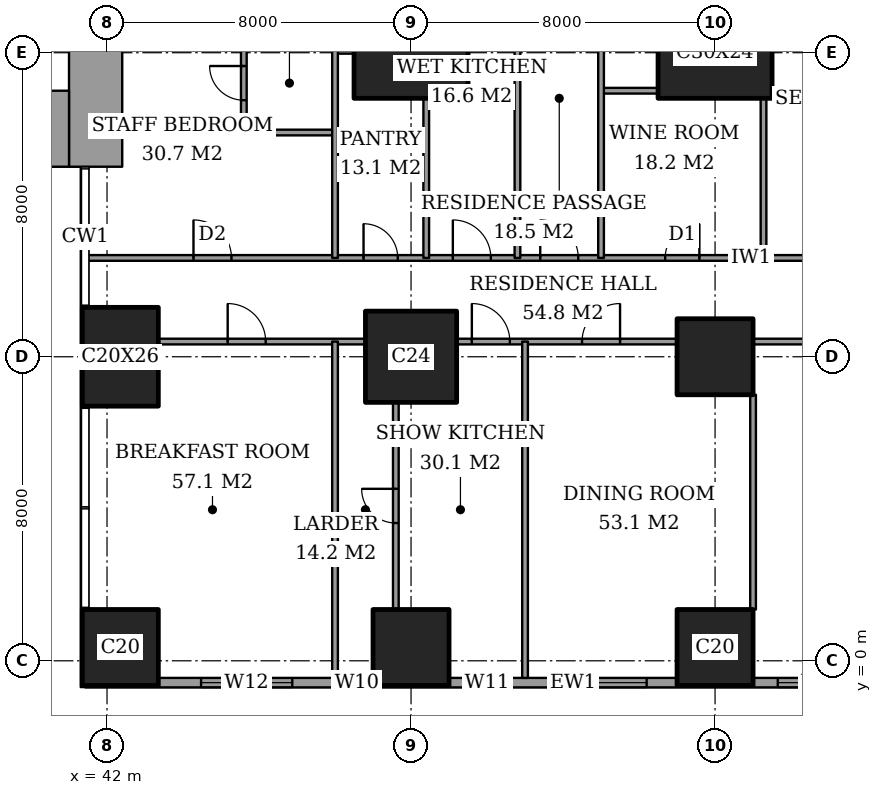
"""IFC4 building model, lengths in metres.
Left out: names, types, materials, properties, quantities, classifications, styles, units other than length and angle.
Written with IfcOpenShell. Run it as: python <this file> out.ifc"""

import sys

from ifc_helpers import new_model, si_unit, direction, frame, frame_2d, origin, origin_2d, place, context, subcontext, project, spatial, rectangle, extrude, element, fill, save


model = new_model("IFC4")
c1 = context("Model", 3, precision=1e-05, world=origin(), true_north=direction((0.0, 1.0)))
c2 = subcontext(c1, "Body", "Model", "MODEL_VIEW")
j1 = project(units=[si_unit("LENGTHUNIT", "METRE"), si_unit("PLANEANGLEUNIT", "RADIAN")], contexts=[c1])
p1 = place(None, origin())
s1 = spatial("IfcSite", under=j1, at=p1, CompositionType="ELEMENT")
p2 = place(p1, origin())
s2 = spatial("IfcBuilding", under=s1, at=p2, CompositionType="ELEMENT")
p3 = place(p2, frame((0.0, 0.0, 150.2)))
s3 = spatial("IfcBuildingStorey", under=s2, at=p3, CompositionType="ELEMENT", Elevation=150.2)
p4 = place(p3, frame((42.35, 0.35, 0.0), z_axis=(0.0, 0.0, 1.0), x_axis=(1.0, 0.0, 0.0)))
e1 = element("IfcColumn", 1, at=p4, inside=s3, PredefinedType="COLUMN", context=c2, shape_type="SweptSolid", body=[
    extrude(rectangle(XDim=2.0, YDim=2.0, at=origin_2d()), origin(), (0.0, 0.0, 1.0), 3.6),
])
p5 = place(p3, frame((42.35, 8.0, 0.0), z_axis=(0.0, 0.0, 1.0), x_axis=(1.0, 0.0, 0.0)))
e2 = element("IfcColumn", 2, at=p5, inside=s3, PredefinedType="COLUMN", context=c2, shape_type="SweptSolid", body=[
    extrude(rectangle(XDim=2.0, YDim=2.6, at=origin_2d()), origin(), (0.0, 0.0, 1.0), 3.6),
])
p6 = place(p3, frame((50.0, 0.35, 0.0), z_axis=(0.0, 0.0, 1.0), x_axis=(1.0, 0.0, 0.0)))
e3 = element("IfcColumn", 3, at=p6, inside=s3, PredefinedType="COLUMN", context=c2, shape_type="SweptSolid", body=[
    extrude(rectangle(XDim=2.0, YDim=2.0, at=origin_2d()), origin(), (0.0, 0.0, 1.0), 3.6),
])
p7 = place(p3, frame((50.0, 8.0, 0.0), z_axis=(0.0, 0.0, 1.0), x_axis=(1.0, 0.0, 0.0)))
e4 = element("IfcColumn", 4, at=p7, inside=s3, PredefinedType="COLUMN", context=c2, shape_type="SweptSolid", body=[
    extrude(rectangle(XDim=2.4, YDim=2.4, at=origin_2d()), origin(), (0.0, 0.0, 1.0), 3.6),
])
p8 = place(p3, frame((50.0, 16.0, 0.0), z_axis=(0.0, 0.0, 1.0), x_axis=(1.0, 0.0, 0.0)))
e5 = element("IfcColumn", 5, at=p8, inside=s3, PredefinedType="COLUMN", context=c2, shape_type="SweptSolid", body=[
    extrude(rectangle(XDim=3.0, YDim=2.4, at=origin_2d()), origin(), (0.0, 0.0, 1.0), 3.6),
])
for number, where, z_axis, x_axis in (
    (6, (58.0, 0.35, 0.0), (0.0, 0.0, 1.0), (1.0, 0.0, 0.0)),
    (7, (58.0, 8.0, 0.0), (0.0, 0.0, 1.0), (1.0, 0.0, 0.0)),
):
    element("IfcColumn", number, at=place(p3, frame(where, z_axis=z_axis, x_axis=x_axis)), inside=s3, PredefinedType="COLUMN", context=c2, shape_type="SweptSolid", body=[
        extrude(rectangle(XDim=2.0, YDim=2.0, at=origin_2d()), origin(), (0.0, 0.0, 1.0), 3.6),
    ])
p9 = place(p3, frame((58.0, 16.0, 0.0), z_axis=(0.0, 0.0, 1.0), x_axis=(1.0, 0.0, 0.0)))
e8 = element("IfcColumn", 8, at=p9, inside=s3, PredefinedType="COLUMN", context=c2, shape_type="SweptSolid", body=[
    extrude(rectangle(XDim=3.0, YDim=2.4, at=origin_2d()), origin(), (0.0, 0.0, 1.0), 3.6),
])
p10 = place(p3, frame((37.85, 14.0, 0.0), z_axis=(0.0, 0.0, 1.0), x_axis=(1.0, 0.0, 0.0)))
e9 = element("IfcWall", 9, at=p10, inside=s3, PredefinedType="SHEAR", context=c2, shape_type="SweptSolid", body=[
    extrude(rectangle(XDim=3.15, YDim=2.0, at=frame_2d((1.575, 0.0))), origin(), (0.0, 0.0, 1.0), 3.6),
])
p11 = place(p3, frame((41.7, 13.0, 0.0), z_axis=(0.0, 0.0, 1.0), x_axis=(0.0, 1.0, 0.0)))
e10 = element("IfcWall", 10, at=p11, inside=s3, PredefinedType="SHEAR", context=c2, shape_type="SweptSolid", body=[
    extrude(rectangle(XDim=11.85, YDim=1.4, at=frame_2d((5.925, 0.0))), origin(), (0.0, 0.0, 1.0), 3.6),
])
p12 = place(p11, frame((7.5, 0.0, 0.0)))
e11 = element("IfcOpeningElement", 11, at=p12, cuts=e10, PredefinedType="OPENING", context=c2, shape_type="SweptSolid", body=[
    extrude(rectangle(XDim=1.8, YDim=2.4, at=frame_2d((0.9, 1.2))), frame((0.0, 0.71, 0.0), z_axis=(0.0, -1.0, 0.0), x_axis=(1.0, 0.0, 0.0)), (0.0, 0.0, 1.0), 1.42),
])
p13 = place(p3, frame((41.425, -0.575, 0.0), z_axis=(0.0, 0.0, 1.0), x_axis=(1.0, 0.0, 0.0)))
e12 = element("IfcWall", 12, at=p13, inside=s3, PredefinedType="SOLIDWALL", context=c2, shape_type="SweptSolid", body=[
    extrude(rectangle(XDim=21.4, YDim=0.25, at=frame_2d((10.7, 0.0))), origin(), (0.0, 0.0, 1.0), 3.6),
])
p14 = place(p13, frame((3.05, 0.0, 0.4)))
e13 = element("IfcOpeningElement", 13, at=p14, cuts=e12, PredefinedType="OPENING", context=c2, shape_type="SweptSolid", body=[
    extrude(rectangle(XDim=2.4, YDim=2.2, at=frame_2d((1.2, 1.1))), frame((0.0, 0.135, 0.0), z_axis=(0.0, -1.0, 0.0), x_axis=(1.0, 0.0, 0.0)), (0.0, 0.0, 1.0), 0.27),
])
p15 = place(p13, frame((6.85, 0.0, 0.4)))
e14 = element("IfcOpeningElement", 14, at=p15, cuts=e12, PredefinedType="OPENING", context=c2, shape_type="SweptSolid", body=[
    extrude(rectangle(XDim=0.6, YDim=2.2, at=frame_2d((0.3, 1.1))), frame((0.0, 0.135, 0.0), z_axis=(0.0, -1.0, 0.0), x_axis=(1.0, 0.0, 0.0)), (0.0, 0.0, 1.0), 0.27),
])
p16 = place(p13, frame((9.975, 0.0, 0.4)))
e15 = element("IfcOpeningElement", 15, at=p16, cuts=e12, PredefinedType="OPENING", context=c2, shape_type="SweptSolid", body=[
    extrude(rectangle(XDim=1.2, YDim=2.2, at=frame_2d((0.6, 1.1))), frame((0.0, 0.135, 0.0), z_axis=(0.0, -1.0, 0.0), x_axis=(1.0, 0.0, 0.0)), (0.0, 0.0, 1.0), 0.27),
])
p17 = place(p13, frame((12.375, 0.0, 0.4)))
e16 = element("IfcOpeningElement", 16, at=p17, cuts=e12, PredefinedType="OPENING", context=c2, shape_type="SweptSolid", body=[
    extrude(rectangle(XDim=2.4, YDim=2.2, at=frame_2d((1.2, 1.1))), frame((0.0, 0.135, 0.0), z_axis=(0.0, -1.0, 0.0), x_axis=(1.0, 0.0, 0.0)), (0.0, 0.0, 1.0), 0.27),
])
p18 = place(p13, frame((18.225, 0.0, 0.4)))
e17 = element("IfcOpeningElement", 17, at=p18, cuts=e12, PredefinedType="OPENING", context=c2, shape_type="SweptSolid", body=[
    extrude(rectangle(XDim=2.4, YDim=2.2, at=frame_2d((1.2, 1.1))), frame((0.0, 0.135, 0.0), z_axis=(0.0, -1.0, 0.0), x_axis=(1.0, 0.0, 0.0)), (0.0, 0.0, 1.0), 0.27),
])
p19 = place(p3, frame((43.35, 8.4, 0.0), z_axis=(0.0, 0.0, 1.0), x_axis=(1.0, 0.0, 0.0)))
e18 = element("IfcWall", 18, at=p19, inside=s3, PredefinedType="PARTITIONING", context=c2, shape_type="SweptSolid", body=[
    extrude(rectangle(XDim=5.45, YDim=0.15, at=frame_2d((2.725, 0.0))), origin(), (0.0, 0.0, 1.0), 3.35),
])
p20 = place(p19, frame((1.825, 0.0, 0.0)))
e19 = element("IfcOpeningElement", 19, at=p20, cuts=e18, PredefinedType="OPENING", context=c2, shape_type="SweptSolid", body=[
    extrude(rectangle(XDim=1.0, YDim=2.1, at=frame_2d((0.5, 1.05))), frame((0.0, 0.085, 0.0), z_axis=(0.0, -1.0, 0.0), x_axis=(1.0, 0.0, 0.0)), (0.0, 0.0, 1.0), 0.17),
])
p21 = place(p3, frame((51.2, 8.4, 0.0), z_axis=(0.0, 0.0, 1.0), x_axis=(1.0, 0.0, 0.0)))
e20 = element("IfcWall", 20, at=p21, inside=s3, PredefinedType="PARTITIONING", context=c2, shape_type="SweptSolid", body=[
    extrude(rectangle(XDim=5.8, YDim=0.15, at=frame_2d((2.9, 0.0))), origin(), (0.0, 0.0, 1.0), 3.35),
])
p22 = place(p21, frame((3.3, 0.0, 0.0)))
e21 = element("IfcOpeningElement", 21, at=p22, cuts=e20, PredefinedType="OPENING", context=c2, shape_type="SweptSolid", body=[
    extrude(rectangle(XDim=1.0, YDim=2.1, at=frame_2d((0.5, 1.05))), frame((0.0, 0.085, 0.0), z_axis=(0.0, -1.0, 0.0), x_axis=(1.0, 0.0, 0.0)), (0.0, 0.0, 1.0), 0.17),
])
p23 = place(p21, frame((0.4, 0.0, 0.0)))
e22 = element("IfcOpeningElement", 22, at=p23, cuts=e20, PredefinedType="OPENING", context=c2, shape_type="SweptSolid", body=[
    extrude(rectangle(XDim=1.0, YDim=2.1, at=frame_2d((0.5, 1.05))), frame((0.0, 0.085, 0.0), z_axis=(0.0, -1.0, 0.0), x_axis=(1.0, 0.0, 0.0)), (0.0, 0.0, 1.0), 0.17),
])
p24 = place(p3, frame((59.0, 8.4, 0.0), z_axis=(0.0, 0.0, 1.0), x_axis=(1.0, 0.0, 0.0)))
e23 = element("IfcWall", 23, at=p24, inside=s3, PredefinedType="PARTITIONING", context=c2, shape_type="SweptSolid", body=[
    extrude(rectangle(XDim=5.65, YDim=0.15, at=frame_2d((2.825, 0.0))), origin(), (0.0, 0.0, 1.0), 3.35),
])
p25 = place(p24, frame((2.325, 0.0, 0.0)))
e24 = element("IfcOpeningElement", 24, at=p25, cuts=e23, PredefinedType="OPENING", context=c2, shape_type="SweptSolid", body=[
    extrude(rectangle(XDim=1.0, YDim=2.1, at=frame_2d((0.5, 1.05))), frame((0.0, 0.085, 0.0), z_axis=(0.0, -1.0, 0.0), x_axis=(1.0, 0.0, 0.0)), (0.0, 0.0, 1.0), 0.17),
])
p26 = place(p3, frame((41.439, 10.6, 0.0), z_axis=(0.0, 0.0, 1.0), x_axis=(1.0, 0.0, 0.0)))
e25 = element("IfcWall", 25, at=p26, inside=s3, PredefinedType="PARTITIONING", context=c2, shape_type="SweptSolid", body=[
    extrude(rectangle(XDim=25.011, YDim=0.15, at=frame_2d((12.505, 0.0))), origin(), (0.0, 0.0, 1.0), 3.35),
])
p27 = place(p26, frame((11.961, 0.0, 0.0)))
e26 = element("IfcOpeningElement", 26, at=p27, cuts=e25, PredefinedType="OPENING", context=c2, shape_type="SweptSolid", body=[
    extrude(rectangle(XDim=1.0, YDim=2.1, at=frame_2d((0.5, 1.05))), frame((0.0, 0.085, 0.0), z_axis=(0.0, -1.0, 0.0), x_axis=(1.0, 0.0, 0.0)), (0.0, 0.0, 1.0), 0.17),
])
p28 = place(p26, frame((20.924, 0.0, 0.0)))
e27 = element("IfcOpeningElement", 27, at=p28, cuts=e25, PredefinedType="OPENING", context=c2, shape_type="SweptSolid", body=[
    extrude(rectangle(XDim=1.0, YDim=2.1, at=frame_2d((0.5, 1.05))), frame((0.0, 0.085, 0.0), z_axis=(0.0, -1.0, 0.0), x_axis=(1.0, 0.0, 0.0)), (0.0, 0.0, 1.0), 0.17),
])
p29 = place(p26, frame((15.249, 0.0, 0.0)))
e28 = element("IfcOpeningElement", 28, at=p29, cuts=e25, PredefinedType="OPENING", context=c2, shape_type="SweptSolid", body=[
    extrude(rectangle(XDim=0.9, YDim=2.1, at=frame_2d((0.45, 1.05))), frame((0.0, 0.085, 0.0), z_axis=(0.0, -1.0, 0.0), x_axis=(1.0, 0.0, 0.0)), (0.0, 0.0, 1.0), 0.17),
])
p30 = place(p26, frame((9.661, 0.0, 0.0)))
e29 = element("IfcOpeningElement", 29, at=p30, cuts=e25, PredefinedType="OPENING", context=c2, shape_type="SweptSolid", body=[
    extrude(rectangle(XDim=1.0, YDim=2.1, at=frame_2d((0.5, 1.05))), frame((0.0, 0.085, 0.0), z_axis=(0.0, -1.0, 0.0), x_axis=(1.0, 0.0, 0.0)), (0.0, 0.0, 1.0), 0.17),
])
p31 = place(p26, frame((7.311, 0.0, 0.0)))
e30 = element("IfcOpeningElement", 30, at=p31, cuts=e25, PredefinedType="OPENING", context=c2, shape_type="SweptSolid", body=[
    extrude(rectangle(XDim=0.9, YDim=2.1, at=frame_2d((0.45, 1.05))), frame((0.0, 0.085, 0.0), z_axis=(0.0, -1.0, 0.0), x_axis=(1.0, 0.0, 0.0)), (0.0, 0.0, 1.0), 0.17),
])
p32 = place(p26, frame((2.836, 0.0, 0.0)))
e31 = element("IfcOpeningElement", 31, at=p32, cuts=e25, PredefinedType="OPENING", context=c2, shape_type="SweptSolid", body=[
    extrude(rectangle(XDim=1.0, YDim=2.1, at=frame_2d((0.5, 1.05))), frame((0.0, 0.085, 0.0), z_axis=(0.0, -1.0, 0.0), x_axis=(1.0, 0.0, 0.0)), (0.0, 0.0, 1.0), 0.17),
])
p33 = place(p3, frame((45.6, 13.9, 0.0), z_axis=(0.0, 0.0, 1.0), x_axis=(1.0, 0.0, 0.0)))
e32 = element("IfcWall", 32, at=p33, inside=s3, PredefinedType="PARTITIONING", context=c2, shape_type="SweptSolid", body=[
    extrude(rectangle(XDim=2.4, YDim=0.15, at=frame_2d((1.2, 0.0))), origin(), (0.0, 0.0, 1.0), 3.35),
])
p34 = place(p3, frame((55.0, 15.0, 0.0), z_axis=(0.0, 0.0, 1.0), x_axis=(1.0, 0.0, 0.0)))
e33 = element("IfcWall", 33, at=p34, inside=s3, PredefinedType="PARTITIONING", context=c2, shape_type="SweptSolid", body=[
    extrude(rectangle(XDim=1.5, YDim=0.15, at=frame_2d((0.75, 0.0))), origin(), (0.0, 0.0, 1.0), 3.35),
])
p35 = place(p3, frame((48.0, 16.05, 0.0), z_axis=(0.0, 0.0, 1.0), x_axis=(1.0, 0.0, 0.0)))
e34 = element("IfcWall", 34, at=p35, inside=s3, PredefinedType="PARTITIONING", context=c2, shape_type="SweptSolid", body=[
    extrude(rectangle(XDim=0.5, YDim=0.15, at=frame_2d((0.25, 0.0))), origin(), (0.0, 0.0, 1.0), 2.634),
])
p36 = place(p3, frame((45.6, 13.9, 0.0), z_axis=(0.0, 0.0, 1.0), x_axis=(0.0, 1.0, 0.0)))
e35 = element("IfcWall", 35, at=p36, inside=s3, PredefinedType="PARTITIONING", context=c2, shape_type="SweptSolid", body=[
    extrude(rectangle(XDim=2.6, YDim=0.15, at=frame_2d((1.3, 0.0))), origin(), (0.0, 0.0, 1.0), 3.35),
])
p37 = place(p36, frame((0.85, 0.0, 0.0)))
e36 = element("IfcOpeningElement", 36, at=p37, cuts=e35, PredefinedType="OPENING", context=c2, shape_type="SweptSolid", body=[
    extrude(rectangle(XDim=0.9, YDim=2.1, at=frame_2d((0.45, 1.05))), frame((0.0, 0.085, 0.0), z_axis=(0.0, -1.0, 0.0), x_axis=(1.0, 0.0, 0.0)), (0.0, 0.0, 1.0), 0.17),
])
p38 = place(p3, frame((48.0, -0.45, 0.0), z_axis=(0.0, 0.0, 1.0), x_axis=(0.0, 1.0, 0.0)))
e37 = element("IfcWall", 37, at=p38, inside=s3, PredefinedType="PARTITIONING", context=c2, shape_type="SweptSolid", body=[
    extrude(rectangle(XDim=8.85, YDim=0.15, at=frame_2d((4.425, 0.0))), origin(), (0.0, 0.0, 1.0), 3.35),
])
p39 = place(p3, frame((48.0, 10.6, 0.0), z_axis=(0.0, 0.0, 1.0), x_axis=(0.0, 1.0, 0.0)))
e38 = element("IfcWall", 38, at=p39, inside=s3, PredefinedType="PARTITIONING", context=c2, shape_type="SweptSolid", body=[
    extrude(rectangle(XDim=8.4, YDim=0.15, at=frame_2d((4.2, 0.0))), origin(), (0.0, 0.0, 1.0), 3.35),
])
p40 = place(p39, frame((6.7, 0.0, 0.0)))
e39 = element("IfcOpeningElement", 39, at=p40, cuts=e38, PredefinedType="OPENING", context=c2, shape_type="SweptSolid", body=[
    extrude(rectangle(XDim=0.9, YDim=2.1, at=frame_2d((0.45, 1.05))), frame((0.0, 0.085, 0.0), z_axis=(0.0, -1.0, 0.0), x_axis=(1.0, 0.0, 0.0)), (0.0, 0.0, 1.0), 0.17),
])
p41 = place(p3, frame((49.6, 1.35, 0.0), z_axis=(0.0, 0.0, 1.0), x_axis=(0.0, 1.0, 0.0)))
e40 = element("IfcWall", 40, at=p41, inside=s3, PredefinedType="PARTITIONING", context=c2, shape_type="SweptSolid", body=[
    extrude(rectangle(XDim=5.45, YDim=0.15, at=frame_2d((2.725, 0.0))), origin(), (0.0, 0.0, 1.0), 3.35),
])
p42 = place(p41, frame((2.275, 0.0, 0.0)))
e41 = element("IfcOpeningElement", 41, at=p42, cuts=e40, PredefinedType="OPENING", context=c2, shape_type="SweptSolid", body=[
    extrude(rectangle(XDim=0.9, YDim=2.1, at=frame_2d((0.45, 1.05))), frame((0.0, 0.085, 0.0), z_axis=(0.0, -1.0, 0.0), x_axis=(1.0, 0.0, 0.0)), (0.0, 0.0, 1.0), 0.17),
])
p43 = place(p3, frame((50.4, 10.6, 0.0), z_axis=(0.0, 0.0, 1.0), x_axis=(0.0, 1.0, 0.0)))
e42 = element("IfcWall", 42, at=p43, inside=s3, PredefinedType="PARTITIONING", context=c2, shape_type="SweptSolid", body=[
    extrude(rectangle(XDim=4.2, YDim=0.15, at=frame_2d((2.1, 0.0))), origin(), (0.0, 0.0, 1.0), 3.35),
])
p44 = place(p3, frame((52.8, 10.6, 0.0), z_axis=(0.0, 0.0, 1.0), x_axis=(0.0, 1.0, 0.0)))
e43 = element("IfcWall", 43, at=p44, inside=s3, PredefinedType="PARTITIONING", context=c2, shape_type="SweptSolid", body=[
    extrude(rectangle(XDim=8.4, YDim=0.15, at=frame_2d((4.2, 0.0))), origin(), (0.0, 0.0, 1.0), 3.35),
])
p45 = place(p3, frame((53.0, -0.45, 0.0), z_axis=(0.0, 0.0, 1.0), x_axis=(0.0, 1.0, 0.0)))
e44 = element("IfcWall", 44, at=p45, inside=s3, PredefinedType="PARTITIONING", context=c2, shape_type="SweptSolid", body=[
    extrude(rectangle(XDim=8.85, YDim=0.15, at=frame_2d((4.425, 0.0))), origin(), (0.0, 0.0, 1.0), 3.35),
])
p46 = place(p3, frame((55.0, 10.6, 0.0), z_axis=(0.0, 0.0, 1.0), x_axis=(0.0, 1.0, 0.0)))
e45 = element("IfcWall", 45, at=p46, inside=s3, PredefinedType="PARTITIONING", context=c2, shape_type="SweptSolid", body=[
    extrude(rectangle(XDim=11.0, YDim=0.15, at=frame_2d((5.5, 0.0))), origin(), (0.0, 0.0, 1.0), 3.35),
])
p47 = place(p46, frame((9.2, 0.0, 0.0)))
e46 = element("IfcOpeningElement", 46, at=p47, cuts=e45, PredefinedType="OPENING", context=c2, shape_type="SweptSolid", body=[
    extrude(rectangle(XDim=1.0, YDim=2.1, at=frame_2d((0.5, 1.05))), frame((0.0, 0.085, 0.0), z_axis=(0.0, -1.0, 0.0), x_axis=(1.0, 0.0, 0.0)), (0.0, 0.0, 1.0), 0.17),
])
p48 = place(p3, frame((59.0, 1.35, 0.0), z_axis=(0.0, 0.0, 1.0), x_axis=(0.0, 1.0, 0.0)))
e47 = element("IfcWall", 47, at=p48, inside=s3, PredefinedType="PARTITIONING", context=c2, shape_type="SweptSolid", body=[
    extrude(rectangle(XDim=5.65, YDim=0.15, at=frame_2d((2.825, 0.0))), origin(), (0.0, 0.0, 1.0), 3.35),
])
p49 = place(p3, frame((59.275, 10.6, 0.0), z_axis=(0.0, 0.0, 1.0), x_axis=(0.0, 1.0, 0.0)))
e48 = element("IfcWall", 48, at=p49, inside=s3, PredefinedType="PARTITIONING", context=c2, shape_type="SweptSolid", body=[
    extrude(rectangle(XDim=4.2, YDim=0.15, at=frame_2d((2.1, 0.0))), origin(), (0.0, 0.0, 1.0), 3.35),
])
p50 = place(p14, origin())
e49 = element("IfcWindow", 49, at=p50, inside=s3, PartitioningType="SINGLE_PANEL", PredefinedType="WINDOW", context=c2, shape_type="SweptSolid", body=[
    extrude(rectangle(XDim=2.4, YDim=2.2, at=frame_2d((1.2, 1.1))), frame((0.0, 0.03, 0.0), z_axis=(0.0, -1.0, 0.0), x_axis=(1.0, 0.0, 0.0)), (0.0, 0.0, 1.0), 0.06),
])
fill(e13, e49)
p51 = place(p15, origin())
e50 = element("IfcWindow", 50, at=p51, inside=s3, PartitioningType="SINGLE_PANEL", PredefinedType="WINDOW", context=c2, shape_type="SweptSolid", body=[
    extrude(rectangle(XDim=0.6, YDim=2.2, at=frame_2d((0.3, 1.1))), frame((0.0, 0.03, 0.0), z_axis=(0.0, -1.0, 0.0), x_axis=(1.0, 0.0, 0.0)), (0.0, 0.0, 1.0), 0.06),
])
fill(e14, e50)
p52 = place(p16, origin())
e51 = element("IfcWindow", 51, at=p52, inside=s3, PartitioningType="SINGLE_PANEL", PredefinedType="WINDOW", context=c2, shape_type="SweptSolid", body=[
    extrude(rectangle(XDim=1.2, YDim=2.2, at=frame_2d((0.6, 1.1))), frame((0.0, 0.03, 0.0), z_axis=(0.0, -1.0, 0.0), x_axis=(1.0, 0.0, 0.0)), (0.0, 0.0, 1.0), 0.06),
])
fill(e15, e51)
p53 = place(p17, origin())
e52 = element("IfcWindow", 52, at=p53, inside=s3, PartitioningType="SINGLE_PANEL", PredefinedType="WINDOW", context=c2, shape_type="SweptSolid", body=[
    extrude(rectangle(XDim=2.4, YDim=2.2, at=frame_2d((1.2, 1.1))), frame((0.0, 0.03, 0.0), z_axis=(0.0, -1.0, 0.0), x_axis=(1.0, 0.0, 0.0)), (0.0, 0.0, 1.0), 0.06),
])
fill(e16, e52)
p54 = place(p18, origin())
e53 = element("IfcWindow", 53, at=p54, inside=s3, PartitioningType="SINGLE_PANEL", PredefinedType="WINDOW", context=c2, shape_type="SweptSolid", body=[
    extrude(rectangle(XDim=2.4, YDim=2.2, at=frame_2d((1.2, 1.1))), frame((0.0, 0.03, 0.0), z_axis=(0.0, -1.0, 0.0), x_axis=(1.0, 0.0, 0.0)), (0.0, 0.0, 1.0), 0.06),
])
fill(e17, e53)
p55 = place(p22, origin())
e54 = element("IfcDoor", 54, at=p55, inside=s3, OperationType="SINGLE_SWING_LEFT", PredefinedType="DOOR", context=c2, shape_type="SweptSolid", body=[
    extrude(rectangle(XDim=1.0, YDim=2.1, at=frame_2d((0.5, 1.05))), frame((0.0, 0.025, 0.0), z_axis=(0.0, -1.0, 0.0), x_axis=(1.0, 0.0, 0.0)), (0.0, 0.0, 1.0), 0.05),
])
fill(e21, e54)
p56 = place(p23, origin())
e55 = element("IfcDoor", 55, at=p56, inside=s3, OperationType="SINGLE_SWING_RIGHT", PredefinedType="DOOR", context=c2, shape_type="SweptSolid", body=[
    extrude(rectangle(XDim=1.0, YDim=2.1, at=frame_2d((0.5, 1.05))), frame((0.0, 0.025, 0.0), z_axis=(0.0, -1.0, 0.0), x_axis=(1.0, 0.0, 0.0)), (0.0, 0.0, 1.0), 0.05),
])
fill(e22, e55)
p57 = place(p42, origin())
e56 = element("IfcDoor", 56, at=p57, inside=s3, OperationType="SINGLE_SWING_LEFT", PredefinedType="DOOR", context=c2, shape_type="SweptSolid", body=[
    extrude(rectangle(XDim=0.9, YDim=2.1, at=frame_2d((0.45, 1.05))), frame((0.0, 0.025, 0.0), z_axis=(0.0, -1.0, 0.0), x_axis=(1.0, 0.0, 0.0)), (0.0, 0.0, 1.0), 0.05),
])
fill(e41, e56)
p58 = place(p20, origin())
e57 = element("IfcDoor", 57, at=p58, inside=s3, OperationType="SINGLE_SWING_RIGHT", PredefinedType="DOOR", context=c2, shape_type="SweptSolid", body=[
    extrude(rectangle(XDim=1.0, YDim=2.1, at=frame_2d((0.5, 1.05))), frame((0.0, 0.025, 0.0), z_axis=(0.0, -1.0, 0.0), x_axis=(1.0, 0.0, 0.0)), (0.0, 0.0, 1.0), 0.05),
])
fill(e19, e57)
p59 = place(p27, origin())
e58 = element("IfcDoor", 58, at=p59, inside=s3, OperationType="SINGLE_SWING_RIGHT", PredefinedType="DOOR", context=c2, shape_type="SweptSolid", body=[
    extrude(rectangle(XDim=1.0, YDim=2.1, at=frame_2d((0.5, 1.05))), frame((0.0, 0.025, 0.0), z_axis=(0.0, -1.0, 0.0), x_axis=(1.0, 0.0, 0.0)), (0.0, 0.0, 1.0), 0.05),
])
fill(e26, e58)
p60 = place(p29, origin())
e59 = element("IfcDoor", 59, at=p60, inside=s3, OperationType="SINGLE_SWING_LEFT", PredefinedType="DOOR", context=c2, shape_type="SweptSolid", body=[
    extrude(rectangle(XDim=0.9, YDim=2.1, at=frame_2d((0.45, 1.05))), frame((0.0, 0.025, 0.0), z_axis=(0.0, -1.0, 0.0), x_axis=(1.0, 0.0, 0.0)), (0.0, 0.0, 1.0), 0.05),
])
fill(e28, e59)
p61 = place(p30, origin())
e60 = element("IfcDoor", 60, at=p61, inside=s3, OperationType="SINGLE_SWING_RIGHT", PredefinedType="DOOR", context=c2, shape_type="SweptSolid", body=[
    extrude(rectangle(XDim=1.0, YDim=2.1, at=frame_2d((0.5, 1.05))), frame((0.0, 0.025, 0.0), z_axis=(0.0, -1.0, 0.0), x_axis=(1.0, 0.0, 0.0)), (0.0, 0.0, 1.0), 0.05),
])
fill(e29, e60)
p62 = place(p31, origin())
e61 = element("IfcDoor", 61, at=p62, inside=s3, OperationType="SINGLE_SWING_RIGHT", PredefinedType="DOOR", context=c2, shape_type="SweptSolid", body=[
    extrude(rectangle(XDim=0.9, YDim=2.1, at=frame_2d((0.45, 1.05))), frame((0.0, 0.025, 0.0), z_axis=(0.0, -1.0, 0.0), x_axis=(1.0, 0.0, 0.0)), (0.0, 0.0, 1.0), 0.05),
])
fill(e30, e61)
p63 = place(p37, origin())
e62 = element("IfcDoor", 62, at=p63, inside=s3, OperationType="SINGLE_SWING_LEFT", PredefinedType="DOOR", context=c2, shape_type="SweptSolid", body=[
    extrude(rectangle(XDim=0.9, YDim=2.1, at=frame_2d((0.45, 1.05))), frame((0.0, 0.025, 0.0), z_axis=(0.0, -1.0, 0.0), x_axis=(1.0, 0.0, 0.0)), (0.0, 0.0, 1.0), 0.05),
])
fill(e36, e62)
p64 = place(p32, origin())
e63 = element("IfcDoor", 63, at=p64, inside=s3, OperationType="SINGLE_SWING_RIGHT", PredefinedType="DOOR", context=c2, shape_type="SweptSolid", body=[
    extrude(rectangle(XDim=1.0, YDim=2.1, at=frame_2d((0.5, 1.05))), frame((0.0, 0.025, 0.0), z_axis=(0.0, -1.0, 0.0), x_axis=(1.0, 0.0, 0.0)), (0.0, 0.0, 1.0), 0.05),
])
fill(e31, e63)
save(model, sys.argv[1])
